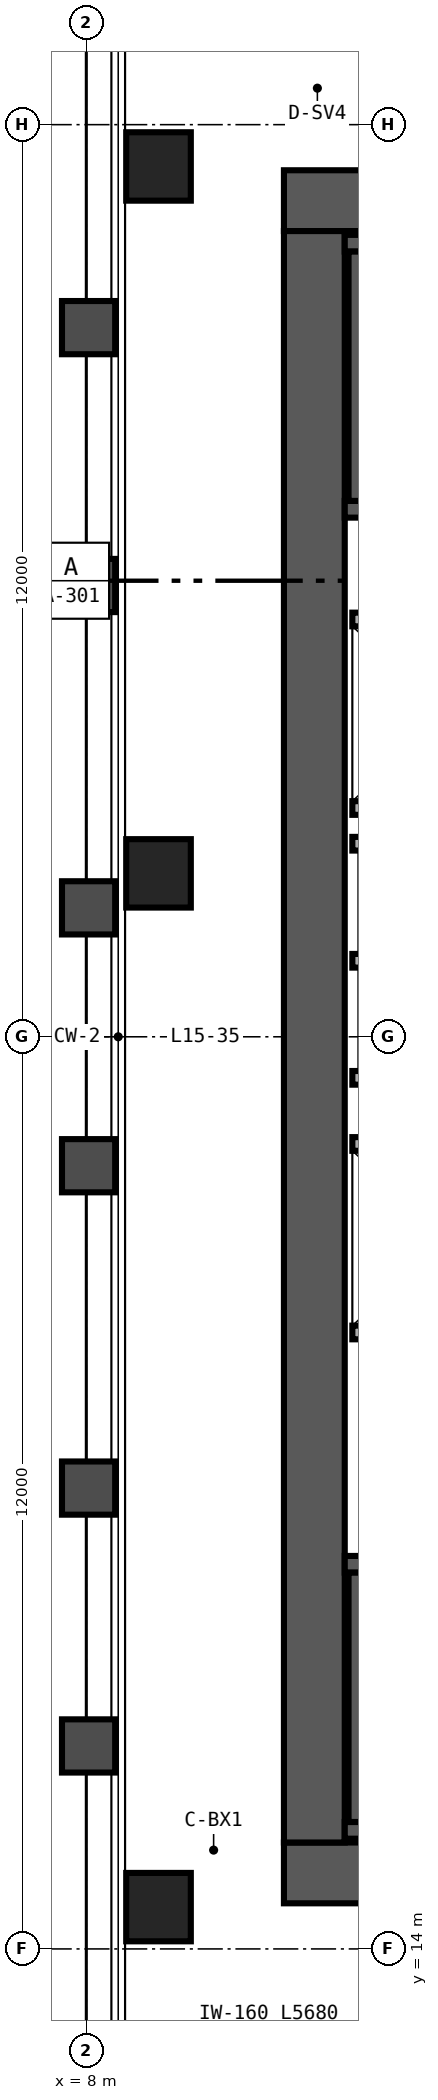
"""IFC4 building model, lengths in metres.
Left out: names, types, materials, properties, quantities, classifications, styles, units other than length and angle.
Written with IfcOpenShell. Run it as: python <this file> out.ifc"""

import sys

from ifc_helpers import new_model, si_unit, direction, frame, frame_2d, origin, origin_2d, place, context, subcontext, project, spatial, rectangle, hollow_rectangle, extrude, source, transform, mapped, element, save


model = new_model("IFC4")
c1 = context("Model", 3, precision=1e-05, world=origin(), true_north=direction((0.0, 1.0)))
c2 = subcontext(c1, "Body", "Model", "MODEL_VIEW")
j1 = project(units=[si_unit("LENGTHUNIT", "METRE"), si_unit("PLANEANGLEUNIT", "RADIAN")], contexts=[c1])
p1 = place(None, origin())
s1 = spatial("IfcSite", under=j1, at=p1, CompositionType="ELEMENT")
p2 = place(p1, origin())
s2 = spatial("IfcBuilding", under=s1, at=p2, CompositionType="ELEMENT")
p3 = place(p2, frame((0.0, 0.0, 63.6)))
s3 = spatial("IfcBuildingStorey", under=s2, at=p3, CompositionType="ELEMENT", Elevation=63.6)
p4 = place(p3, frame((10.6, 15.0, 0.0), z_axis=(0.0, 0.0, 1.0), x_axis=(1.0, 0.0, 0.0)))
e1 = element("IfcWall", 1, at=p4, inside=s3, PredefinedType="SHEAR", context=c2, shape_type="SweptSolid", body=[
    extrude(rectangle(XDim=12.8, YDim=0.8, at=frame_2d((6.4, 0.0))), origin(), (0.0, 0.0, 1.0), 3.35),
])
p5 = place(p4, frame((8.98, 0.0, 0.0)))
e2 = element("IfcOpeningElement", 2, at=p5, cuts=e1, PredefinedType="OPENING", context=c2, shape_type="SweptSolid", body=[
    extrude(rectangle(XDim=1.0, YDim=2.15, at=frame_2d((0.5, 1.075))), frame((0.0, 0.41, 0.0), z_axis=(0.0, -1.0, 0.0), x_axis=(1.0, 0.0, 0.0)), (0.0, 0.0, 1.0), 0.82),
])
p6 = place(p3, frame((10.6, 37.0, 0.0), z_axis=(0.0, 0.0, 1.0), x_axis=(1.0, 0.0, 0.0)))
e3 = element("IfcWall", 3, at=p6, inside=s3, PredefinedType="SHEAR", context=c2, shape_type="SweptSolid", body=[
    extrude(rectangle(XDim=12.8, YDim=0.8, at=frame_2d((6.4, 0.0))), origin(), (0.0, 0.0, 1.0), 3.35),
])
p7 = place(p6, frame((8.98, 0.0, 0.0)))
e4 = element("IfcOpeningElement", 4, at=p7, cuts=e3, PredefinedType="OPENING", context=c2, shape_type="SweptSolid", body=[
    extrude(rectangle(XDim=1.0, YDim=2.15, at=frame_2d((0.5, 1.075))), frame((0.0, 0.41, 0.0), z_axis=(0.0, -1.0, 0.0), x_axis=(1.0, 0.0, 0.0)), (0.0, 0.0, 1.0), 0.82),
])
p8 = place(p3, frame((11.0, 15.4, 0.0), z_axis=(0.0, 0.0, 1.0), x_axis=(0.0, 1.0, 0.0)))
e5 = element("IfcWall", 5, at=p8, inside=s3, PredefinedType="SHEAR", context=c2, shape_type="SweptSolid", body=[
    extrude(rectangle(XDim=21.2, YDim=0.8, at=frame_2d((10.6, 0.0))), origin(), (0.0, 0.0, 1.0), 3.35),
])
p9 = place(p3, frame((11.4, 15.56, 0.0), z_axis=(0.0, 0.0, 1.0), x_axis=(1.0, 0.0, 0.0)))
e6 = element("IfcWall", 6, at=p9, inside=s3, PredefinedType="SHEAR", context=c2, shape_type="SweptSolid", body=[
    extrude(rectangle(XDim=7.91, YDim=0.22, at=frame_2d((3.955, 0.0))), origin(), (0.0, 0.0, 1.0), 3.4),
])
p10 = place(p3, frame((11.4, 19.06, 0.0), z_axis=(0.0, 0.0, 1.0), x_axis=(1.0, 0.0, 0.0)))
e7 = element("IfcWall", 7, at=p10, inside=s3, PredefinedType="SHEAR", context=c2, shape_type="SweptSolid", body=[
    extrude(rectangle(XDim=7.91, YDim=0.22, at=frame_2d((3.955, 0.0))), origin(), (0.0, 0.0, 1.0), 3.4),
])
p11 = place(p10, frame((0.52, 0.0, 0.0)))
e8 = element("IfcOpeningElement", 8, at=p11, cuts=e7, PredefinedType="OPENING", context=c2, shape_type="SweptSolid", body=[
    extrude(rectangle(XDim=1.05, YDim=2.15, at=frame_2d((0.525, 1.075))), frame((0.0, 0.12, 0.0), z_axis=(0.0, -1.0, 0.0), x_axis=(1.0, 0.0, 0.0)), (0.0, 0.0, 1.0), 0.24),
])
p12 = place(p3, frame((11.56, 15.67, 0.0), z_axis=(0.0, 0.0, 1.0), x_axis=(0.0, 1.0, 0.0)))
e9 = element("IfcWall", 9, at=p12, inside=s3, PredefinedType="SHEAR", context=c2, shape_type="SweptSolid", body=[
    extrude(rectangle(XDim=3.28, YDim=0.22, at=frame_2d((1.64, 0.0))), origin(), (0.0, 0.0, 1.0), 3.4),
])
p13 = place(p3, frame((11.4, 32.94, 0.0), z_axis=(0.0, 0.0, 1.0), x_axis=(1.0, 0.0, 0.0)))
e10 = element("IfcWall", 10, at=p13, inside=s3, PredefinedType="SHEAR", context=c2, shape_type="SweptSolid", body=[
    extrude(rectangle(XDim=7.91, YDim=0.22, at=frame_2d((3.955, 0.0))), origin(), (0.0, 0.0, 1.0), 3.4),
])
p14 = place(p13, frame((0.52, 0.0, 0.0)))
e11 = element("IfcOpeningElement", 11, at=p14, cuts=e10, PredefinedType="OPENING", context=c2, shape_type="SweptSolid", body=[
    extrude(rectangle(XDim=1.05, YDim=2.15, at=frame_2d((0.525, 1.075))), frame((0.0, 0.12, 0.0), z_axis=(0.0, -1.0, 0.0), x_axis=(1.0, 0.0, 0.0)), (0.0, 0.0, 1.0), 0.24),
])
p15 = place(p3, frame((11.4, 36.44, 0.0), z_axis=(0.0, 0.0, 1.0), x_axis=(1.0, 0.0, 0.0)))
e12 = element("IfcWall", 12, at=p15, inside=s3, PredefinedType="SHEAR", context=c2, shape_type="SweptSolid", body=[
    extrude(rectangle(XDim=7.91, YDim=0.22, at=frame_2d((3.955, 0.0))), origin(), (0.0, 0.0, 1.0), 3.4),
])
p16 = place(p3, frame((11.56, 33.05, 0.0), z_axis=(0.0, 0.0, 1.0), x_axis=(0.0, 1.0, 0.0)))
e13 = element("IfcWall", 13, at=p16, inside=s3, PredefinedType="SHEAR", context=c2, shape_type="SweptSolid", body=[
    extrude(rectangle(XDim=3.28, YDim=0.22, at=frame_2d((1.64, 0.0))), origin(), (0.0, 0.0, 1.0), 3.4),
])
m1 = source(origin(), c2, "Body", "SweptSolid", [
    extrude(hollow_rectangle(XDim=0.85, YDim=0.9, WallThickness=0.04, at=origin_2d()), origin(), (0.0, 0.0, 1.0), 3.35),
])
for number, where, z_axis, x_axis in (
    (14, (8.95, 14.55, 0.0), (0.0, 0.0, 1.0), (1.0, 0.0, 0.0)),
    (15, (8.95, 28.15, 0.0), (0.0, 0.0, 1.0), (1.0, 0.0, 0.0)),
    (16, (8.95, 37.45, 0.0), (0.0, 0.0, 1.0), (1.0, 0.0, 0.0)),
):
    element("IfcColumn", number, at=place(p3, frame(where, z_axis=z_axis, x_axis=x_axis)), inside=s3, PredefinedType="COLUMN", context=c2, shape_type="MappedRepresentation", body=[
        mapped(m1, transform((0.0, 0.0, 0.0), scale=1.0)),
    ])
for number, where, z_axis, x_axis in (
    (17, (11.5, 22.11, 0.0), (0.0, 0.0, 1.0), (1.0, 0.0, 0.0)),
    (18, (11.5, 24.59, 0.0), (0.0, 0.0, 1.0), (1.0, 0.0, 0.0)),
    (19, (11.5, 29.01, 0.0), (0.0, 0.0, 1.0), (1.0, 0.0, 0.0)),
    (20, (11.5, 31.49, 0.0), (0.0, 0.0, 1.0), (1.0, 0.0, 0.0)),
):
    element("IfcWall", number, at=place(p3, frame(where, z_axis=z_axis, x_axis=x_axis)), inside=s3, PredefinedType="SOLIDWALL", context=c2, shape_type="SweptSolid", body=[
        extrude(rectangle(XDim=2.5, YDim=0.18, at=frame_2d((1.25, 0.0))), origin(), (0.0, 0.0, 1.0), 3.35),
    ])
for number, where, z_axis, x_axis in (
    (21, (11.5, 25.46, 0.0), (0.0, 0.0, 1.0), (1.0, 0.0, 0.0)),
    (22, (11.5, 27.0, 0.0), (0.0, 0.0, 1.0), (1.0, 0.0, 0.0)),
    (23, (11.5, 28.54, 0.0), (0.0, 0.0, 1.0), (1.0, 0.0, 0.0)),
):
    element("IfcWall", number, at=place(p3, frame(where, z_axis=z_axis, x_axis=x_axis)), inside=s3, PredefinedType="SOLIDWALL", context=c2, shape_type="SweptSolid", body=[
        extrude(rectangle(XDim=2.51, YDim=0.18, at=frame_2d((1.255, 0.0))), origin(), (0.0, 0.0, 1.0), 3.35),
    ])
save(model, sys.argv[1])
